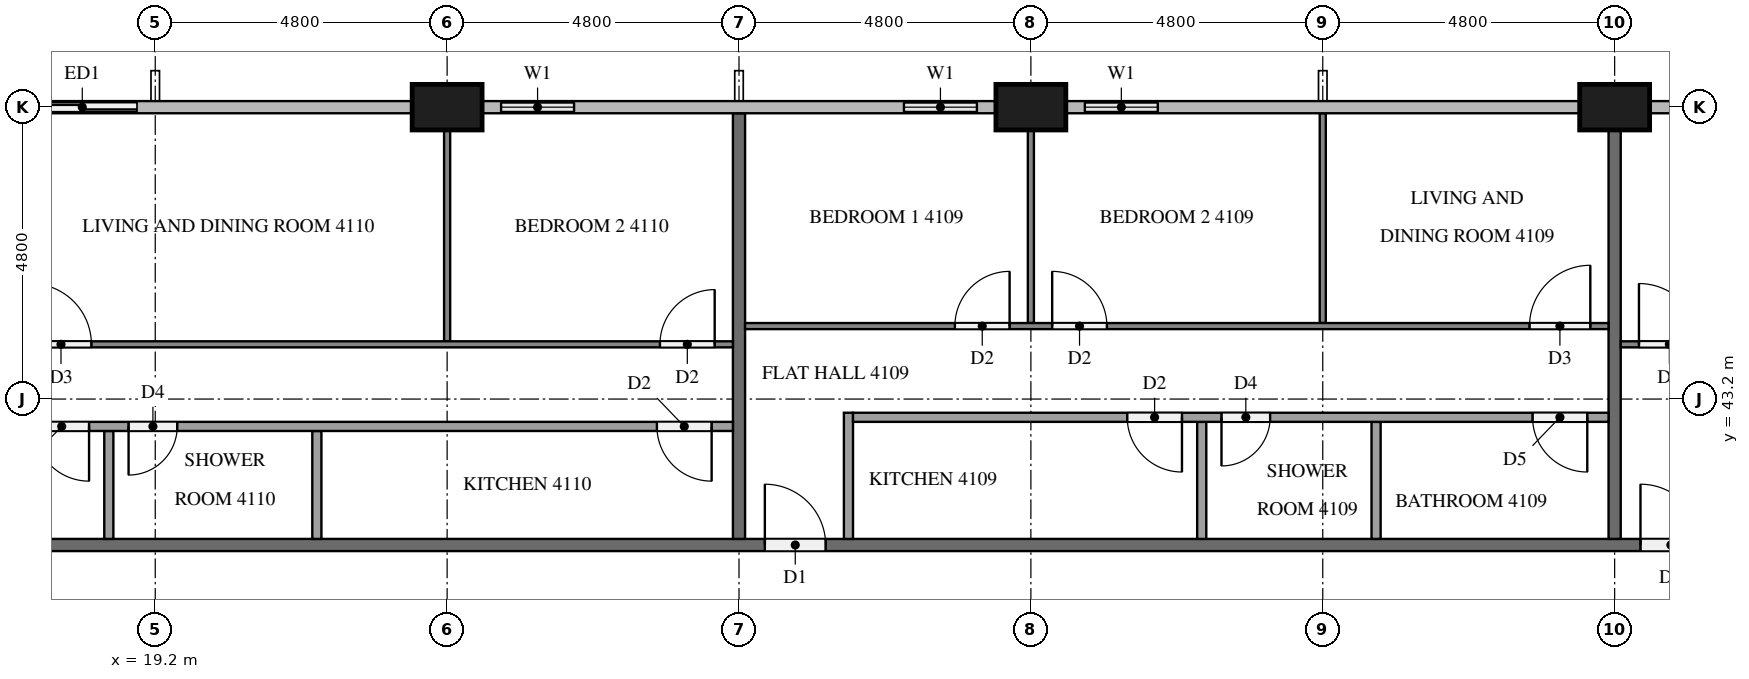
"""IFC4 building model, lengths in metres.
Left out: names, types, materials, properties, quantities, classifications, styles, units other than length and angle.
Written with IfcOpenShell. Run it as: python <this file> out.ifc"""

import sys

from ifc_helpers import new_model, si_unit, direction, frame, frame_2d, origin, origin_2d, place, context, subcontext, project, spatial, rectangle, extrude, element, fill, save


model = new_model("IFC4")
c1 = context("Model", 3, precision=1e-05, world=origin(), true_north=direction((0.0, 1.0)))
c2 = subcontext(c1, "Body", "Model", "MODEL_VIEW")
j1 = project(units=[si_unit("LENGTHUNIT", "METRE"), si_unit("PLANEANGLEUNIT", "RADIAN")], contexts=[c1])
p1 = place(None, origin())
s1 = spatial("IfcSite", under=j1, at=p1, CompositionType="ELEMENT")
p2 = place(p1, origin())
s2 = spatial("IfcBuilding", under=s1, at=p2, CompositionType="ELEMENT")
p3 = place(p2, frame((0.0, 0.0, 159.5)))
s3 = spatial("IfcBuildingStorey", under=s2, at=p3, CompositionType="ELEMENT", Elevation=159.5)
for number, where, z_axis, x_axis in (
    (1, (43.2, 48.0, 0.0), (0.0, 0.0, 1.0), (1.0, 0.0, 0.0)),
    (2, (33.6, 48.0, 0.0), (0.0, 0.0, 1.0), (1.0, 0.0, 0.0)),
    (3, (24.0, 48.0, 0.0), (0.0, 0.0, 1.0), (1.0, 0.0, 0.0)),
):
    element("IfcColumn", number, at=place(p3, frame(where, z_axis=z_axis, x_axis=x_axis)), inside=s3, PredefinedType="COLUMN", context=c2, shape_type="SweptSolid", body=[
        extrude(rectangle(XDim=1.15, YDim=0.75, at=origin_2d()), origin(), (0.0, 0.0, 1.0), 3.2),
    ])
p4 = place(p3, frame((36.0, 48.0, 0.0), z_axis=(0.0, 0.0, 1.0), x_axis=(-1.0, 0.0, 0.0)))
e4 = element("IfcWall", 4, at=p4, inside=s3, PredefinedType="SOLIDWALL", context=c2, shape_type="SweptSolid", body=[
    extrude(rectangle(XDim=1.825, YDim=0.15, at=frame_2d((0.913, 0.0))), origin(), (0.0, 0.0, 1.0), 3.2),
])
p5 = place(p4, frame((0.312, 0.0, 0.9)))
e5 = element("IfcOpeningElement", 5, at=p5, cuts=e4, PredefinedType="OPENING", context=c2, shape_type="SweptSolid", body=[
    extrude(rectangle(XDim=1.2, YDim=1.4, at=frame_2d((0.6, 0.7))), frame((0.0, 0.085, 0.0), z_axis=(0.0, -1.0, 0.0), x_axis=(1.0, 0.0, 0.0)), (0.0, 0.0, 1.0), 0.17),
])
p6 = place(p3, frame((33.025, 48.0, 0.0), z_axis=(0.0, 0.0, 1.0), x_axis=(-1.0, 0.0, 0.0)))
e6 = element("IfcWall", 6, at=p6, inside=s3, PredefinedType="SOLIDWALL", context=c2, shape_type="SweptSolid", body=[
    extrude(rectangle(XDim=1.825, YDim=0.15, at=frame_2d((0.913, 0.0))), origin(), (0.0, 0.0, 1.0), 3.2),
])
p7 = place(p6, frame((0.312, 0.0, 0.9)))
e7 = element("IfcOpeningElement", 7, at=p7, cuts=e6, PredefinedType="OPENING", context=c2, shape_type="SweptSolid", body=[
    extrude(rectangle(XDim=1.2, YDim=1.4, at=frame_2d((0.6, 0.7))), frame((0.0, 0.085, 0.0), z_axis=(0.0, -1.0, 0.0), x_axis=(1.0, 0.0, 0.0)), (0.0, 0.0, 1.0), 0.17),
])
p8 = place(p3, frame((26.4, 48.0, 0.0), z_axis=(0.0, 0.0, 1.0), x_axis=(-1.0, 0.0, 0.0)))
e8 = element("IfcWall", 8, at=p8, inside=s3, PredefinedType="SOLIDWALL", context=c2, shape_type="SweptSolid", body=[
    extrude(rectangle(XDim=1.825, YDim=0.15, at=frame_2d((0.913, 0.0))), origin(), (0.0, 0.0, 1.0), 3.2),
])
p9 = place(p8, frame((0.312, 0.0, 0.9)))
e9 = element("IfcOpeningElement", 9, at=p9, cuts=e8, PredefinedType="OPENING", context=c2, shape_type="SweptSolid", body=[
    extrude(rectangle(XDim=1.2, YDim=1.4, at=frame_2d((0.6, 0.7))), frame((0.0, 0.085, 0.0), z_axis=(0.0, -1.0, 0.0), x_axis=(1.0, 0.0, 0.0)), (0.0, 0.0, 1.0), 0.17),
])
p10 = place(p3, frame((19.2, 48.0, 0.0), z_axis=(0.0, 0.0, 1.0), x_axis=(-1.0, 0.0, 0.0)))
e10 = element("IfcWall", 10, at=p10, inside=s3, PredefinedType="SOLIDWALL", context=c2, shape_type="SweptSolid", body=[
    extrude(rectangle(XDim=4.225, YDim=0.15, at=frame_2d((2.112, 0.0))), origin(), (0.0, 0.0, 1.0), 3.2),
])
p11 = place(p10, frame((0.3, 0.0, 0.0)))
e11 = element("IfcOpeningElement", 11, at=p11, cuts=e10, PredefinedType="OPENING", context=c2, shape_type="SweptSolid", body=[
    extrude(rectangle(XDim=1.8, YDim=2.4, at=frame_2d((0.9, 1.2))), frame((0.0, 0.085, 0.0), z_axis=(0.0, -1.0, 0.0), x_axis=(1.0, 0.0, 0.0)), (0.0, 0.0, 1.0), 0.17),
])
p12 = place(p10, frame((2.712, 0.0, 0.9)))
e12 = element("IfcOpeningElement", 12, at=p12, cuts=e10, PredefinedType="OPENING", context=c2, shape_type="SweptSolid", body=[
    extrude(rectangle(XDim=1.2, YDim=1.4, at=frame_2d((0.6, 0.7))), frame((0.0, 0.085, 0.0), z_axis=(0.0, -1.0, 0.0), x_axis=(1.0, 0.0, 0.0)), (0.0, 0.0, 1.0), 0.17),
])
p13 = place(p3, frame((11.9, 40.8, 0.0), z_axis=(0.0, 0.0, 1.0), x_axis=(1.0, 0.0, 0.0)))
e13 = element("IfcWall", 13, at=p13, inside=s3, PredefinedType="PARTITIONING", context=c2, shape_type="SweptSolid", body=[
    extrude(rectangle(XDim=38.6, YDim=0.2, at=frame_2d((19.3, 0.0))), origin(), (0.0, 0.0, 1.0), 3.2),
])
p14 = place(p13, frame((31.725, 0.0, 0.0)))
e14 = element("IfcOpeningElement", 14, at=p14, cuts=e13, PredefinedType="OPENING", context=c2, shape_type="SweptSolid", body=[
    extrude(rectangle(XDim=1.0, YDim=2.1, at=frame_2d((0.5, 1.05))), frame((0.0, 0.11, 0.0), z_axis=(0.0, -1.0, 0.0), x_axis=(1.0, 0.0, 0.0)), (0.0, 0.0, 1.0), 0.22),
])
p15 = place(p13, frame((17.325, 0.0, 0.0)))
e15 = element("IfcOpeningElement", 15, at=p15, cuts=e13, PredefinedType="OPENING", context=c2, shape_type="SweptSolid", body=[
    extrude(rectangle(XDim=1.0, YDim=2.1, at=frame_2d((0.5, 1.05))), frame((0.0, 0.11, 0.0), z_axis=(0.0, -1.0, 0.0), x_axis=(1.0, 0.0, 0.0)), (0.0, 0.0, 1.0), 0.22),
])
p16 = place(p13, frame((0.525, 0.0, 0.0)))
e16 = element("IfcOpeningElement", 16, at=p16, cuts=e13, PredefinedType="OPENING", context=c2, shape_type="SweptSolid", body=[
    extrude(rectangle(XDim=1.0, YDim=2.1, at=frame_2d((0.5, 1.05))), frame((0.0, 0.11, 0.0), z_axis=(0.0, -1.0, 0.0), x_axis=(1.0, 0.0, 0.0)), (0.0, 0.0, 1.0), 0.22),
])
p17 = place(p3, frame((43.2, 47.625, 0.0), z_axis=(0.0, 0.0, 1.0), x_axis=(0.0, -1.0, 0.0)))
e17 = element("IfcWall", 17, at=p17, inside=s3, PredefinedType="PARTITIONING", context=c2, shape_type="SweptSolid", body=[
    extrude(rectangle(XDim=6.725, YDim=0.2, at=frame_2d((3.363, 0.0))), origin(), (0.0, 0.0, 1.0), 3.2),
])
p18 = place(p3, frame((28.8, 47.9, 0.0), z_axis=(0.0, 0.0, 1.0), x_axis=(0.0, -1.0, 0.0)))
e18 = element("IfcWall", 18, at=p18, inside=s3, PredefinedType="PARTITIONING", context=c2, shape_type="SweptSolid", body=[
    extrude(rectangle(XDim=7.0, YDim=0.2, at=frame_2d((3.5, 0.0))), origin(), (0.0, 0.0, 1.0), 3.2),
])
p19 = place(p3, frame((43.3, 44.1, 0.0), z_axis=(0.0, 0.0, 1.0), x_axis=(1.0, 0.0, 0.0)))
e19 = element("IfcWall", 19, at=p19, inside=s3, PredefinedType="PARTITIONING", context=c2, shape_type="SweptSolid", body=[
    extrude(rectangle(XDim=7.0, YDim=0.1, at=frame_2d((3.5, 0.0))), origin(), (0.0, 0.0, 1.0), 3.2),
])
p20 = place(p19, frame((0.3, 0.0, 0.0)))
e20 = element("IfcOpeningElement", 20, at=p20, cuts=e19, PredefinedType="OPENING", context=c2, shape_type="SweptSolid", body=[
    extrude(rectangle(XDim=1.0, YDim=2.1, at=frame_2d((0.5, 1.05))), frame((0.0, 0.06, 0.0), z_axis=(0.0, -1.0, 0.0), x_axis=(1.0, 0.0, 0.0)), (0.0, 0.0, 1.0), 0.12),
])
p21 = place(p3, frame((33.6, 44.45, 0.0), z_axis=(0.0, 0.0, 1.0), x_axis=(0.0, 1.0, 0.0)))
e21 = element("IfcWall", 21, at=p21, inside=s3, PredefinedType="PARTITIONING", context=c2, shape_type="SweptSolid", body=[
    extrude(rectangle(XDim=3.175, YDim=0.1, at=frame_2d((1.587, 0.0))), origin(), (0.0, 0.0, 1.0), 3.2),
])
p22 = place(p3, frame((38.4, 44.45, 0.0), z_axis=(0.0, 0.0, 1.0), x_axis=(0.0, 1.0, 0.0)))
e22 = element("IfcWall", 22, at=p22, inside=s3, PredefinedType="PARTITIONING", context=c2, shape_type="SweptSolid", body=[
    extrude(rectangle(XDim=3.45, YDim=0.1, at=frame_2d((1.725, 0.0))), origin(), (0.0, 0.0, 1.0), 3.2),
])
p23 = place(p3, frame((28.9, 44.4, 0.0), z_axis=(0.0, 0.0, 1.0), x_axis=(1.0, 0.0, 0.0)))
e23 = element("IfcWall", 23, at=p23, inside=s3, PredefinedType="PARTITIONING", context=c2, shape_type="SweptSolid", body=[
    extrude(rectangle(XDim=14.2, YDim=0.1, at=frame_2d((7.1, 0.0))), origin(), (0.0, 0.0, 1.0), 3.2),
])
p24 = place(p23, frame((3.45, 0.0, 0.0)))
e24 = element("IfcOpeningElement", 24, at=p24, cuts=e23, PredefinedType="OPENING", context=c2, shape_type="SweptSolid", body=[
    extrude(rectangle(XDim=0.9, YDim=2.1, at=frame_2d((0.45, 1.05))), frame((0.0, 0.06, 0.0), z_axis=(0.0, -1.0, 0.0), x_axis=(1.0, 0.0, 0.0)), (0.0, 0.0, 1.0), 0.12),
])
p25 = place(p23, frame((5.05, 0.0, 0.0)))
e25 = element("IfcOpeningElement", 25, at=p25, cuts=e23, PredefinedType="OPENING", context=c2, shape_type="SweptSolid", body=[
    extrude(rectangle(XDim=0.9, YDim=2.1, at=frame_2d((0.45, 1.05))), frame((0.0, 0.06, 0.0), z_axis=(0.0, -1.0, 0.0), x_axis=(1.0, 0.0, 0.0)), (0.0, 0.0, 1.0), 0.12),
])
p26 = place(p23, frame((12.9, 0.0, 0.0)))
e26 = element("IfcOpeningElement", 26, at=p26, cuts=e23, PredefinedType="OPENING", context=c2, shape_type="SweptSolid", body=[
    extrude(rectangle(XDim=1.0, YDim=2.1, at=frame_2d((0.5, 1.05))), frame((0.0, 0.06, 0.0), z_axis=(0.0, -1.0, 0.0), x_axis=(1.0, 0.0, 0.0)), (0.0, 0.0, 1.0), 0.12),
])
for number, where, z_axis, x_axis in (
    (27, (36.41, 40.9, 0.0), (0.0, 0.0, 1.0), (0.0, 1.0, 0.0)),
    (28, (39.277, 40.9, 0.0), (0.0, 0.0, 1.0), (0.0, 1.0, 0.0)),
):
    element("IfcWall", number, at=place(p3, frame(where, z_axis=z_axis, x_axis=x_axis)), inside=s3, PredefinedType="PARTITIONING", context=c2, shape_type="SweptSolid", body=[
        extrude(rectangle(XDim=1.925, YDim=0.15, at=frame_2d((0.962, 0.0))), origin(), (0.0, 0.0, 1.0), 3.2),
    ])
p27 = place(p3, frame((30.6, 40.9, 0.0), z_axis=(0.0, 0.0, 1.0), x_axis=(0.0, 1.0, 0.0)))
e29 = element("IfcWall", 29, at=p27, inside=s3, PredefinedType="PARTITIONING", context=c2, shape_type="SweptSolid", body=[
    extrude(rectangle(XDim=2.075, YDim=0.15, at=frame_2d((1.038, 0.0))), origin(), (0.0, 0.0, 1.0), 3.2),
])
p28 = place(p3, frame((43.1, 42.9, 0.0), z_axis=(0.0, 0.0, 1.0), x_axis=(-1.0, 0.0, 0.0)))
e30 = element("IfcWall", 30, at=p28, inside=s3, PredefinedType="PARTITIONING", context=c2, shape_type="SweptSolid", body=[
    extrude(rectangle(XDim=12.425, YDim=0.15, at=frame_2d((6.212, 0.0))), origin(), (0.0, 0.0, 1.0), 3.2),
])
p29 = place(p28, frame((7.015, 0.0, 0.0)))
e31 = element("IfcOpeningElement", 31, at=p29, cuts=e30, PredefinedType="OPENING", context=c2, shape_type="SweptSolid", body=[
    extrude(rectangle(XDim=0.9, YDim=2.1, at=frame_2d((0.45, 1.05))), frame((0.0, 0.085, 0.0), z_axis=(0.0, -1.0, 0.0), x_axis=(1.0, 0.0, 0.0)), (0.0, 0.0, 1.0), 0.17),
])
p30 = place(p28, frame((5.565, 0.0, 0.0)))
e32 = element("IfcOpeningElement", 32, at=p30, cuts=e30, PredefinedType="OPENING", context=c2, shape_type="SweptSolid", body=[
    extrude(rectangle(XDim=0.8, YDim=2.1, at=frame_2d((0.4, 1.05))), frame((0.0, 0.085, 0.0), z_axis=(0.0, -1.0, 0.0), x_axis=(1.0, 0.0, 0.0)), (0.0, 0.0, 1.0), 0.17),
])
p31 = place(p28, frame((0.35, 0.0, 0.0)))
e33 = element("IfcOpeningElement", 33, at=p31, cuts=e30, PredefinedType="OPENING", context=c2, shape_type="SweptSolid", body=[
    extrude(rectangle(XDim=0.9, YDim=2.1, at=frame_2d((0.45, 1.05))), frame((0.0, 0.085, 0.0), z_axis=(0.0, -1.0, 0.0), x_axis=(1.0, 0.0, 0.0)), (0.0, 0.0, 1.0), 0.17),
])
p32 = place(p3, frame((24.0, 44.15, 0.0), z_axis=(0.0, 0.0, 1.0), x_axis=(0.0, 1.0, 0.0)))
e34 = element("IfcWall", 34, at=p32, inside=s3, PredefinedType="PARTITIONING", context=c2, shape_type="SweptSolid", body=[
    extrude(rectangle(XDim=3.475, YDim=0.1, at=frame_2d((1.738, 0.0))), origin(), (0.0, 0.0, 1.0), 3.2),
])
p33 = place(p3, frame((12.1, 44.1, 0.0), z_axis=(0.0, 0.0, 1.0), x_axis=(1.0, 0.0, 0.0)))
e35 = element("IfcWall", 35, at=p33, inside=s3, PredefinedType="PARTITIONING", context=c2, shape_type="SweptSolid", body=[
    extrude(rectangle(XDim=16.6, YDim=0.1, at=frame_2d((8.3, 0.0))), origin(), (0.0, 0.0, 1.0), 3.2),
])
p34 = place(p33, frame((3.45, 0.0, 0.0)))
e36 = element("IfcOpeningElement", 36, at=p34, cuts=e35, PredefinedType="OPENING", context=c2, shape_type="SweptSolid", body=[
    extrude(rectangle(XDim=0.9, YDim=2.1, at=frame_2d((0.45, 1.05))), frame((0.0, 0.06, 0.0), z_axis=(0.0, -1.0, 0.0), x_axis=(1.0, 0.0, 0.0)), (0.0, 0.0, 1.0), 0.12),
])
p35 = place(p33, frame((5.05, 0.0, 0.0)))
e37 = element("IfcOpeningElement", 37, at=p35, cuts=e35, PredefinedType="OPENING", context=c2, shape_type="SweptSolid", body=[
    extrude(rectangle(XDim=1.0, YDim=2.1, at=frame_2d((0.5, 1.05))), frame((0.0, 0.06, 0.0), z_axis=(0.0, -1.0, 0.0), x_axis=(1.0, 0.0, 0.0)), (0.0, 0.0, 1.0), 0.12),
])
p36 = place(p33, frame((15.4, 0.0, 0.0)))
e38 = element("IfcOpeningElement", 38, at=p36, cuts=e35, PredefinedType="OPENING", context=c2, shape_type="SweptSolid", body=[
    extrude(rectangle(XDim=0.9, YDim=2.1, at=frame_2d((0.45, 1.05))), frame((0.0, 0.06, 0.0), z_axis=(0.0, -1.0, 0.0), x_axis=(1.0, 0.0, 0.0)), (0.0, 0.0, 1.0), 0.12),
])
for number, where, z_axis, x_axis in (
    (39, (18.437, 40.9, 0.0), (0.0, 0.0, 1.0), (0.0, 1.0, 0.0)),
    (40, (21.858, 40.9, 0.0), (0.0, 0.0, 1.0), (0.0, 1.0, 0.0)),
):
    element("IfcWall", number, at=place(p3, frame(where, z_axis=z_axis, x_axis=x_axis)), inside=s3, PredefinedType="PARTITIONING", context=c2, shape_type="SweptSolid", body=[
        extrude(rectangle(XDim=1.775, YDim=0.15, at=frame_2d((0.888, 0.0))), origin(), (0.0, 0.0, 1.0), 3.2),
    ])
p37 = place(p3, frame((28.7, 42.75, 0.0), z_axis=(0.0, 0.0, 1.0), x_axis=(-1.0, 0.0, 0.0)))
e41 = element("IfcWall", 41, at=p37, inside=s3, PredefinedType="PARTITIONING", context=c2, shape_type="SweptSolid", body=[
    extrude(rectangle(XDim=14.825, YDim=0.15, at=frame_2d((7.413, 0.0))), origin(), (0.0, 0.0, 1.0), 3.2),
])
p38 = place(p37, frame((10.588, 0.0, 0.0)))
e42 = element("IfcOpeningElement", 42, at=p38, cuts=e41, PredefinedType="OPENING", context=c2, shape_type="SweptSolid", body=[
    extrude(rectangle(XDim=0.9, YDim=2.1, at=frame_2d((0.45, 1.05))), frame((0.0, 0.085, 0.0), z_axis=(0.0, -1.0, 0.0), x_axis=(1.0, 0.0, 0.0)), (0.0, 0.0, 1.0), 0.17),
])
p39 = place(p37, frame((9.138, 0.0, 0.0)))
e43 = element("IfcOpeningElement", 43, at=p39, cuts=e41, PredefinedType="OPENING", context=c2, shape_type="SweptSolid", body=[
    extrude(rectangle(XDim=0.8, YDim=2.1, at=frame_2d((0.4, 1.05))), frame((0.0, 0.085, 0.0), z_axis=(0.0, -1.0, 0.0), x_axis=(1.0, 0.0, 0.0)), (0.0, 0.0, 1.0), 0.17),
])
p40 = place(p37, frame((0.35, 0.0, 0.0)))
e44 = element("IfcOpeningElement", 44, at=p40, cuts=e41, PredefinedType="OPENING", context=c2, shape_type="SweptSolid", body=[
    extrude(rectangle(XDim=0.9, YDim=2.1, at=frame_2d((0.45, 1.05))), frame((0.0, 0.085, 0.0), z_axis=(0.0, -1.0, 0.0), x_axis=(1.0, 0.0, 0.0)), (0.0, 0.0, 1.0), 0.17),
])
p41 = place(p5, origin())
e45 = element("IfcWindow", 45, at=p41, inside=s3, PartitioningType="SINGLE_PANEL", PredefinedType="WINDOW", context=c2, shape_type="SweptSolid", body=[
    extrude(rectangle(XDim=1.2, YDim=1.4, at=frame_2d((0.6, 0.7))), frame((0.0, 0.03, 0.0), z_axis=(0.0, -1.0, 0.0), x_axis=(1.0, 0.0, 0.0)), (0.0, 0.0, 1.0), 0.06),
])
fill(e5, e45)
p42 = place(p7, origin())
e46 = element("IfcWindow", 46, at=p42, inside=s3, PartitioningType="SINGLE_PANEL", PredefinedType="WINDOW", context=c2, shape_type="SweptSolid", body=[
    extrude(rectangle(XDim=1.2, YDim=1.4, at=frame_2d((0.6, 0.7))), frame((0.0, 0.03, 0.0), z_axis=(0.0, -1.0, 0.0), x_axis=(1.0, 0.0, 0.0)), (0.0, 0.0, 1.0), 0.06),
])
fill(e7, e46)
p43 = place(p9, origin())
e47 = element("IfcWindow", 47, at=p43, inside=s3, PartitioningType="SINGLE_PANEL", PredefinedType="WINDOW", context=c2, shape_type="SweptSolid", body=[
    extrude(rectangle(XDim=1.2, YDim=1.4, at=frame_2d((0.6, 0.7))), frame((0.0, 0.03, 0.0), z_axis=(0.0, -1.0, 0.0), x_axis=(1.0, 0.0, 0.0)), (0.0, 0.0, 1.0), 0.06),
])
fill(e9, e47)
p44 = place(p11, origin())
e48 = element("IfcDoor", 48, at=p44, inside=s3, OperationType="SLIDING_TO_RIGHT", PredefinedType="DOOR", context=c2, shape_type="SweptSolid", body=[
    extrude(rectangle(XDim=1.8, YDim=2.4, at=frame_2d((0.9, 1.2))), frame((0.0, 0.025, 0.0), z_axis=(0.0, -1.0, 0.0), x_axis=(1.0, 0.0, 0.0)), (0.0, 0.0, 1.0), 0.05),
])
fill(e11, e48)
p45 = place(p14, origin())
e49 = element("IfcDoor", 49, at=p45, inside=s3, OperationType="SINGLE_SWING_LEFT", PredefinedType="DOOR", context=c2, shape_type="SweptSolid", body=[
    extrude(rectangle(XDim=1.0, YDim=2.1, at=frame_2d((0.5, 1.05))), frame((0.0, 0.025, 0.0), z_axis=(0.0, -1.0, 0.0), x_axis=(1.0, 0.0, 0.0)), (0.0, 0.0, 1.0), 0.05),
])
fill(e14, e49)
p46 = place(p15, origin())
e50 = element("IfcDoor", 50, at=p46, inside=s3, OperationType="SINGLE_SWING_LEFT", PredefinedType="DOOR", context=c2, shape_type="SweptSolid", body=[
    extrude(rectangle(XDim=1.0, YDim=2.1, at=frame_2d((0.5, 1.05))), frame((0.0, 0.025, 0.0), z_axis=(0.0, -1.0, 0.0), x_axis=(1.0, 0.0, 0.0)), (0.0, 0.0, 1.0), 0.05),
])
fill(e15, e50)
p47 = place(p20, origin())
e51 = element("IfcDoor", 51, at=p47, inside=s3, OperationType="SINGLE_SWING_LEFT", PredefinedType="DOOR", context=c2, shape_type="SweptSolid", body=[
    extrude(rectangle(XDim=1.0, YDim=2.1, at=frame_2d((0.5, 1.05))), frame((0.0, 0.025, 0.0), z_axis=(0.0, -1.0, 0.0), x_axis=(1.0, 0.0, 0.0)), (0.0, 0.0, 1.0), 0.05),
])
fill(e20, e51)
p48 = place(p24, origin())
e52 = element("IfcDoor", 52, at=p48, inside=s3, OperationType="SINGLE_SWING_RIGHT", PredefinedType="DOOR", context=c2, shape_type="SweptSolid", body=[
    extrude(rectangle(XDim=0.9, YDim=2.1, at=frame_2d((0.45, 1.05))), frame((0.0, 0.025, 0.0), z_axis=(0.0, -1.0, 0.0), x_axis=(1.0, 0.0, 0.0)), (0.0, 0.0, 1.0), 0.05),
])
fill(e24, e52)
p49 = place(p25, origin())
e53 = element("IfcDoor", 53, at=p49, inside=s3, OperationType="SINGLE_SWING_LEFT", PredefinedType="DOOR", context=c2, shape_type="SweptSolid", body=[
    extrude(rectangle(XDim=0.9, YDim=2.1, at=frame_2d((0.45, 1.05))), frame((0.0, 0.025, 0.0), z_axis=(0.0, -1.0, 0.0), x_axis=(1.0, 0.0, 0.0)), (0.0, 0.0, 1.0), 0.05),
])
fill(e25, e53)
p50 = place(p26, origin())
e54 = element("IfcDoor", 54, at=p50, inside=s3, OperationType="SINGLE_SWING_RIGHT", PredefinedType="DOOR", context=c2, shape_type="SweptSolid", body=[
    extrude(rectangle(XDim=1.0, YDim=2.1, at=frame_2d((0.5, 1.05))), frame((0.0, 0.025, 0.0), z_axis=(0.0, -1.0, 0.0), x_axis=(1.0, 0.0, 0.0)), (0.0, 0.0, 1.0), 0.05),
])
fill(e26, e54)
p51 = place(p29, origin())
e55 = element("IfcDoor", 55, at=p51, inside=s3, OperationType="SINGLE_SWING_LEFT", PredefinedType="DOOR", context=c2, shape_type="SweptSolid", body=[
    extrude(rectangle(XDim=0.9, YDim=2.1, at=frame_2d((0.45, 1.05))), frame((0.0, 0.025, 0.0), z_axis=(0.0, -1.0, 0.0), x_axis=(1.0, 0.0, 0.0)), (0.0, 0.0, 1.0), 0.05),
])
fill(e31, e55)
p52 = place(p30, origin())
e56 = element("IfcDoor", 56, at=p52, inside=s3, OperationType="SINGLE_SWING_RIGHT", PredefinedType="DOOR", context=c2, shape_type="SweptSolid", body=[
    extrude(rectangle(XDim=0.8, YDim=2.1, at=frame_2d((0.4, 1.05))), frame((0.0, 0.025, 0.0), z_axis=(0.0, -1.0, 0.0), x_axis=(1.0, 0.0, 0.0)), (0.0, 0.0, 1.0), 0.05),
])
fill(e32, e56)
p53 = place(p31, origin())
e57 = element("IfcDoor", 57, at=p53, inside=s3, OperationType="SINGLE_SWING_LEFT", PredefinedType="DOOR", context=c2, shape_type="SweptSolid", body=[
    extrude(rectangle(XDim=0.9, YDim=2.1, at=frame_2d((0.45, 1.05))), frame((0.0, 0.025, 0.0), z_axis=(0.0, -1.0, 0.0), x_axis=(1.0, 0.0, 0.0)), (0.0, 0.0, 1.0), 0.05),
])
fill(e33, e57)
p54 = place(p35, origin())
e58 = element("IfcDoor", 58, at=p54, inside=s3, OperationType="SINGLE_SWING_LEFT", PredefinedType="DOOR", context=c2, shape_type="SweptSolid", body=[
    extrude(rectangle(XDim=1.0, YDim=2.1, at=frame_2d((0.5, 1.05))), frame((0.0, 0.025, 0.0), z_axis=(0.0, -1.0, 0.0), x_axis=(1.0, 0.0, 0.0)), (0.0, 0.0, 1.0), 0.05),
])
fill(e37, e58)
p55 = place(p36, origin())
e59 = element("IfcDoor", 59, at=p55, inside=s3, OperationType="SINGLE_SWING_RIGHT", PredefinedType="DOOR", context=c2, shape_type="SweptSolid", body=[
    extrude(rectangle(XDim=0.9, YDim=2.1, at=frame_2d((0.45, 1.05))), frame((0.0, 0.025, 0.0), z_axis=(0.0, -1.0, 0.0), x_axis=(1.0, 0.0, 0.0)), (0.0, 0.0, 1.0), 0.05),
])
fill(e38, e59)
p56 = place(p38, origin())
e60 = element("IfcDoor", 60, at=p56, inside=s3, OperationType="SINGLE_SWING_LEFT", PredefinedType="DOOR", context=c2, shape_type="SweptSolid", body=[
    extrude(rectangle(XDim=0.9, YDim=2.1, at=frame_2d((0.45, 1.05))), frame((0.0, 0.025, 0.0), z_axis=(0.0, -1.0, 0.0), x_axis=(1.0, 0.0, 0.0)), (0.0, 0.0, 1.0), 0.05),
])
fill(e42, e60)
p57 = place(p39, origin())
e61 = element("IfcDoor", 61, at=p57, inside=s3, OperationType="SINGLE_SWING_RIGHT", PredefinedType="DOOR", context=c2, shape_type="SweptSolid", body=[
    extrude(rectangle(XDim=0.8, YDim=2.1, at=frame_2d((0.4, 1.05))), frame((0.0, 0.025, 0.0), z_axis=(0.0, -1.0, 0.0), x_axis=(1.0, 0.0, 0.0)), (0.0, 0.0, 1.0), 0.05),
])
fill(e43, e61)
p58 = place(p40, origin())
e62 = element("IfcDoor", 62, at=p58, inside=s3, OperationType="SINGLE_SWING_LEFT", PredefinedType="DOOR", context=c2, shape_type="SweptSolid", body=[
    extrude(rectangle(XDim=0.9, YDim=2.1, at=frame_2d((0.45, 1.05))), frame((0.0, 0.025, 0.0), z_axis=(0.0, -1.0, 0.0), x_axis=(1.0, 0.0, 0.0)), (0.0, 0.0, 1.0), 0.05),
])
fill(e44, e62)
save(model, sys.argv[1])
